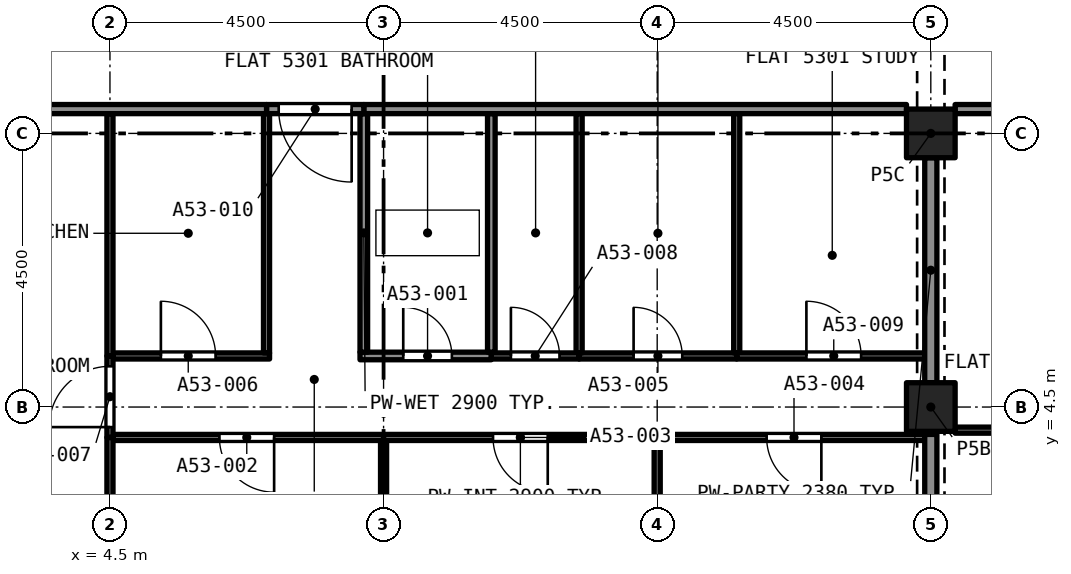
"""IFC4 building model, lengths in metres.
Left out: names, types, materials, properties, quantities, classifications, styles, units other than length and angle.
Written with IfcOpenShell. Run it as: python <this file> out.ifc"""

import sys

from ifc_helpers import new_model, si_unit, direction, frame, frame_2d, origin, origin_2d, place, context, subcontext, project, spatial, rectangle, extrude, element, fill, save


model = new_model("IFC4")
c1 = context("Model", 3, precision=1e-05, world=origin(), true_north=direction((0.0, 1.0)))
c2 = subcontext(c1, "Body", "Model", "MODEL_VIEW")
j1 = project(units=[si_unit("LENGTHUNIT", "METRE"), si_unit("PLANEANGLEUNIT", "RADIAN")], contexts=[c1])
p1 = place(None, origin())
s1 = spatial("IfcSite", under=j1, at=p1, CompositionType="ELEMENT")
p2 = place(p1, origin())
s2 = spatial("IfcBuilding", under=s1, at=p2, CompositionType="ELEMENT")
p3 = place(p2, frame((0.0, 0.0, 192.3)))
s3 = spatial("IfcBuildingStorey", under=s2, at=p3, CompositionType="ELEMENT", Elevation=192.3)
for number, where, z_axis, x_axis in (
    (1, (18.0, 4.5, 0.0), (0.0, 0.0, 1.0), (1.0, 0.0, 0.0)),
    (2, (18.0, 9.0, 0.0), (0.0, 0.0, 1.0), (1.0, 0.0, 0.0)),
):
    element("IfcColumn", number, at=place(p3, frame(where, z_axis=z_axis, x_axis=x_axis)), inside=s3, PredefinedType="COLUMN", context=c2, shape_type="SweptSolid", body=[
        extrude(rectangle(XDim=0.8, YDim=0.8, at=origin_2d()), origin(), (0.0, 0.0, 1.0), 3.2),
    ])
p4 = place(p3, frame((8.613, 5.34, 0.0), z_axis=(0.0, 0.0, 1.0), x_axis=(1.0, 0.0, 0.0)))
e3 = element("IfcWall", 3, at=p4, inside=s3, PredefinedType="PARTITIONING", context=c2, shape_type="SweptSolid", body=[
    extrude(rectangle(XDim=2.159, YDim=0.125, at=frame_2d((1.08, 0.0))), origin(), (0.0, 0.0, 1.0), 2.9),
])
p5 = place(p4, frame((0.711, 0.0, 0.0)))
e4 = element("IfcOpeningElement", 4, at=p5, cuts=e3, PredefinedType="OPENING", context=c2, shape_type="SweptSolid", body=[
    extrude(rectangle(XDim=0.8, YDim=2.1, at=frame_2d((0.4, 1.05))), frame((0.0, 0.073, 0.0), z_axis=(0.0, -1.0, 0.0), x_axis=(1.0, 0.0, 0.0)), (0.0, 0.0, 1.0), 0.145),
])
for number, where, z_axis, x_axis in (
    (5, (8.675, 5.403, 0.0), (0.0, 0.0, 1.0), (0.0, 1.0, 0.0)),
    (6, (10.772, 5.403, 0.0), (0.0, 0.0, 1.0), (0.0, 1.0, 0.0)),
):
    element("IfcWall", number, at=place(p3, frame(where, z_axis=z_axis, x_axis=x_axis)), inside=s3, PredefinedType="PARTITIONING", context=c2, shape_type="SweptSolid", body=[
        extrude(rectangle(XDim=3.922, YDim=0.125, at=frame_2d((1.961, 0.0))), origin(), (0.0, 0.0, 1.0), 2.9),
    ])
p6 = place(p3, frame((8.675, 9.4, 0.0), z_axis=(0.0, 0.0, 1.0), x_axis=(1.0, 0.0, 0.0)))
e7 = element("IfcWall", 7, at=p6, inside=s3, PredefinedType="PARTITIONING", context=c2, shape_type="SweptSolid", body=[
    extrude(rectangle(XDim=8.925, YDim=0.15, at=frame_2d((4.462, 0.0))), origin(), (0.0, 0.0, 1.0), 2.9),
])
p7 = place(p3, frame((9.0, 0.4, 0.0), z_axis=(0.0, 0.0, 1.0), x_axis=(0.0, 1.0, 0.0)))
e8 = element("IfcWall", 8, at=p7, inside=s3, PredefinedType="PARTITIONING", context=c2, shape_type="SweptSolid", body=[
    extrude(rectangle(XDim=3.55, YDim=0.1, at=frame_2d((1.775, 0.0))), origin(), (0.0, 0.0, 1.0), 2.9),
])
p8 = place(p3, frame((9.0, 4.0, 0.0), z_axis=(0.0, 0.0, 1.0), x_axis=(-1.0, 0.0, 0.0)))
e9 = element("IfcWall", 9, at=p8, inside=s3, PredefinedType="PARTITIONING", context=c2, shape_type="SweptSolid", body=[
    extrude(rectangle(XDim=4.45, YDim=0.1, at=frame_2d((2.225, 0.0))), origin(), (0.0, 0.0, 1.0), 2.9),
])
p9 = place(p8, frame((1.8, 0.0, 0.0)))
e10 = element("IfcOpeningElement", 10, at=p9, cuts=e9, PredefinedType="OPENING", context=c2, shape_type="SweptSolid", body=[
    extrude(rectangle(XDim=0.9, YDim=2.1, at=frame_2d((0.45, 1.05))), frame((0.0, 0.06, 0.0), z_axis=(0.0, -1.0, 0.0), x_axis=(1.0, 0.0, 0.0)), (0.0, 0.0, 1.0), 0.12),
])
p10 = place(p3, frame((4.5, 0.433, 0.0), z_axis=(0.0, 0.0, 1.0), x_axis=(0.0, 1.0, 0.0)))
e11 = element("IfcWall", 11, at=p10, inside=s3, PredefinedType="PARTITIONING", context=c2, shape_type="SweptSolid", body=[
    extrude(rectangle(XDim=3.567, YDim=0.1, at=frame_2d((1.784, 0.0))), origin(), (0.0, 0.0, 1.0), 2.9),
])
p11 = place(p3, frame((13.5, 0.4, 0.0), z_axis=(0.0, 0.0, 1.0), x_axis=(0.0, 1.0, 0.0)))
e12 = element("IfcWall", 12, at=p11, inside=s3, PredefinedType="PARTITIONING", context=c2, shape_type="SweptSolid", body=[
    extrude(rectangle(XDim=3.55, YDim=0.1, at=frame_2d((1.775, 0.0))), origin(), (0.0, 0.0, 1.0), 2.9),
])
p12 = place(p3, frame((13.5, 4.0, 0.0), z_axis=(0.0, 0.0, 1.0), x_axis=(-1.0, 0.0, 0.0)))
e13 = element("IfcWall", 13, at=p12, inside=s3, PredefinedType="PARTITIONING", context=c2, shape_type="SweptSolid", body=[
    extrude(rectangle(XDim=4.5, YDim=0.1, at=frame_2d((2.25, 0.0))), origin(), (0.0, 0.0, 1.0), 2.9),
])
p13 = place(p12, frame((1.8, 0.0, 0.0)))
e14 = element("IfcOpeningElement", 14, at=p13, cuts=e13, PredefinedType="OPENING", context=c2, shape_type="SweptSolid", body=[
    extrude(rectangle(XDim=0.9, YDim=2.1, at=frame_2d((0.45, 1.05))), frame((0.0, 0.06, 0.0), z_axis=(0.0, -1.0, 0.0), x_axis=(1.0, 0.0, 0.0)), (0.0, 0.0, 1.0), 0.12),
])
p14 = place(p3, frame((17.9, 4.0, 0.0), z_axis=(0.0, 0.0, 1.0), x_axis=(-1.0, 0.0, 0.0)))
e15 = element("IfcWall", 15, at=p14, inside=s3, PredefinedType="PARTITIONING", context=c2, shape_type="SweptSolid", body=[
    extrude(rectangle(XDim=4.4, YDim=0.1, at=frame_2d((2.2, 0.0))), origin(), (0.0, 0.0, 1.0), 2.9),
])
p15 = place(p14, frame((1.7, 0.0, 0.0)))
e16 = element("IfcOpeningElement", 16, at=p15, cuts=e15, PredefinedType="OPENING", context=c2, shape_type="SweptSolid", body=[
    extrude(rectangle(XDim=0.9, YDim=2.1, at=frame_2d((0.45, 1.05))), frame((0.0, 0.06, 0.0), z_axis=(0.0, -1.0, 0.0), x_axis=(1.0, 0.0, 0.0)), (0.0, 0.0, 1.0), 0.12),
])
p16 = place(p3, frame((18.0, 0.4, 0.0), z_axis=(0.0, 0.0, 1.0), x_axis=(0.0, 1.0, 0.0)))
e17 = element("IfcWall", 17, at=p16, inside=s3, PredefinedType="PARTITIONING", context=c2, shape_type="SweptSolid", body=[
    extrude(rectangle(XDim=3.65, YDim=0.2, at=frame_2d((1.825, 0.0))), origin(), (0.0, 0.0, 1.0), 2.38),
])
p17 = place(p3, frame((12.216, 5.34, 0.0), z_axis=(0.0, 0.0, 1.0), x_axis=(1.0, 0.0, 0.0)))
e18 = element("IfcWall", 18, at=p17, inside=s3, PredefinedType="PARTITIONING", context=c2, shape_type="SweptSolid", body=[
    extrude(rectangle(XDim=2.591, YDim=0.1, at=frame_2d((1.296, 0.0))), origin(), (0.0, 0.0, 1.0), 2.9),
])
p18 = place(p17, frame((0.896, 0.0, 0.0)))
e19 = element("IfcOpeningElement", 19, at=p18, cuts=e18, PredefinedType="OPENING", context=c2, shape_type="SweptSolid", body=[
    extrude(rectangle(XDim=0.8, YDim=2.1, at=frame_2d((0.4, 1.05))), frame((0.0, 0.06, 0.0), z_axis=(0.0, -1.0, 0.0), x_axis=(1.0, 0.0, 0.0)), (0.0, 0.0, 1.0), 0.12),
])
for number, where, z_axis, x_axis in (
    (20, (12.216, 5.39, 0.0), (0.0, 0.0, 1.0), (0.0, 1.0, 0.0)),
    (21, (14.808, 5.39, 0.0), (0.0, 0.0, 1.0), (0.0, 1.0, 0.0)),
):
    element("IfcWall", number, at=place(p3, frame(where, z_axis=z_axis, x_axis=x_axis)), inside=s3, PredefinedType="PARTITIONING", context=c2, shape_type="SweptSolid", body=[
        extrude(rectangle(XDim=3.935, YDim=0.1, at=frame_2d((1.968, 0.0))), origin(), (0.0, 0.0, 1.0), 2.9),
    ])
p19 = place(p3, frame((4.55, 5.34, 0.0), z_axis=(0.0, 0.0, 1.0), x_axis=(1.0, 0.0, 0.0)))
e22 = element("IfcWall", 22, at=p19, inside=s3, PredefinedType="PARTITIONING", context=c2, shape_type="SweptSolid", body=[
    extrude(rectangle(XDim=2.575, YDim=0.1, at=frame_2d((1.288, 0.0))), origin(), (0.0, 0.0, 1.0), 2.9),
])
p20 = place(p19, frame((0.788, 0.0, 0.0)))
e23 = element("IfcOpeningElement", 23, at=p20, cuts=e22, PredefinedType="OPENING", context=c2, shape_type="SweptSolid", body=[
    extrude(rectangle(XDim=0.9, YDim=2.1, at=frame_2d((0.45, 1.05))), frame((0.0, 0.06, 0.0), z_axis=(0.0, -1.0, 0.0), x_axis=(1.0, 0.0, 0.0)), (0.0, 0.0, 1.0), 0.12),
])
p21 = place(p3, frame((7.075, 5.39, 0.0), z_axis=(0.0, 0.0, 1.0), x_axis=(0.0, 1.0, 0.0)))
e24 = element("IfcWall", 24, at=p21, inside=s3, PredefinedType="PARTITIONING", context=c2, shape_type="SweptSolid", body=[
    extrude(rectangle(XDim=3.935, YDim=0.1, at=frame_2d((1.968, 0.0))), origin(), (0.0, 0.0, 1.0), 2.9),
])
p22 = place(p3, frame((4.5, 4.0, 0.0), z_axis=(0.0, 0.0, 1.0), x_axis=(0.0, 1.0, 0.0)))
e25 = element("IfcWall", 25, at=p22, inside=s3, PredefinedType="PARTITIONING", context=c2, shape_type="SweptSolid", body=[
    extrude(rectangle(XDim=1.34, YDim=0.1, at=frame_2d((0.67, 0.0))), origin(), (0.0, 0.0, 1.0), 2.9),
])
p23 = place(p22, frame((0.17, 0.0, 0.0)))
e26 = element("IfcOpeningElement", 26, at=p23, cuts=e25, PredefinedType="OPENING", context=c2, shape_type="SweptSolid", body=[
    extrude(rectangle(XDim=1.0, YDim=2.1, at=frame_2d((0.5, 1.05))), frame((0.0, 0.06, 0.0), z_axis=(0.0, -1.0, 0.0), x_axis=(1.0, 0.0, 0.0)), (0.0, 0.0, 1.0), 0.12),
])
p24 = place(p3, frame((10.772, 5.34, 0.0), z_axis=(0.0, 0.0, 1.0), x_axis=(1.0, 0.0, 0.0)))
e27 = element("IfcWall", 27, at=p24, inside=s3, PredefinedType="PARTITIONING", context=c2, shape_type="SweptSolid", body=[
    extrude(rectangle(XDim=1.445, YDim=0.1, at=frame_2d((0.722, 0.0))), origin(), (0.0, 0.0, 1.0), 2.9),
])
p25 = place(p24, frame((0.322, 0.0, 0.0)))
e28 = element("IfcOpeningElement", 28, at=p25, cuts=e27, PredefinedType="OPENING", context=c2, shape_type="SweptSolid", body=[
    extrude(rectangle(XDim=0.8, YDim=2.1, at=frame_2d((0.4, 1.05))), frame((0.0, 0.06, 0.0), z_axis=(0.0, -1.0, 0.0), x_axis=(1.0, 0.0, 0.0)), (0.0, 0.0, 1.0), 0.12),
])
p26 = place(p3, frame((14.808, 5.34, 0.0), z_axis=(0.0, 0.0, 1.0), x_axis=(1.0, 0.0, 0.0)))
e29 = element("IfcWall", 29, at=p26, inside=s3, PredefinedType="PARTITIONING", context=c2, shape_type="SweptSolid", body=[
    extrude(rectangle(XDim=3.092, YDim=0.1, at=frame_2d((1.546, 0.0))), origin(), (0.0, 0.0, 1.0), 2.9),
])
p27 = place(p26, frame((1.146, 0.0, 0.0)))
e30 = element("IfcOpeningElement", 30, at=p27, cuts=e29, PredefinedType="OPENING", context=c2, shape_type="SweptSolid", body=[
    extrude(rectangle(XDim=0.9, YDim=2.1, at=frame_2d((0.45, 1.05))), frame((0.0, 0.06, 0.0), z_axis=(0.0, -1.0, 0.0), x_axis=(1.0, 0.0, 0.0)), (0.0, 0.0, 1.0), 0.12),
])
p28 = place(p3, frame((18.0, 4.9, 0.0), z_axis=(0.0, 0.0, 1.0), x_axis=(0.0, 1.0, 0.0)))
e31 = element("IfcWall", 31, at=p28, inside=s3, PredefinedType="PARTITIONING", context=c2, shape_type="SweptSolid", body=[
    extrude(rectangle(XDim=3.7, YDim=0.2, at=frame_2d((1.85, 0.0))), origin(), (0.0, 0.0, 1.0), 2.38),
])
p29 = place(p3, frame((8.675, 9.4, 0.0), z_axis=(0.0, 0.0, 1.0), x_axis=(-1.0, 0.0, 0.0)))
e32 = element("IfcWall", 32, at=p29, inside=s3, PredefinedType="PARTITIONING", context=c2, shape_type="SweptSolid", body=[
    extrude(rectangle(XDim=1.6, YDim=0.15, at=frame_2d((0.8, 0.0))), origin(), (0.0, 0.0, 1.0), 2.9),
])
p30 = place(p29, frame((0.2, 0.0, 0.0)))
e33 = element("IfcOpeningElement", 33, at=p30, cuts=e32, PredefinedType="OPENING", context=c2, shape_type="SweptSolid", body=[
    extrude(rectangle(XDim=1.2, YDim=2.4, at=frame_2d((0.6, 1.2))), frame((0.0, 0.085, 0.0), z_axis=(0.0, -1.0, 0.0), x_axis=(1.0, 0.0, 0.0)), (0.0, 0.0, 1.0), 0.17),
])
p31 = place(p3, frame((4.5, 5.34, 0.0), z_axis=(0.0, 0.0, 1.0), x_axis=(0.0, 1.0, 0.0)))
e34 = element("IfcWall", 34, at=p31, inside=s3, PredefinedType="PARTITIONING", context=c2, shape_type="SweptSolid", body=[
    extrude(rectangle(XDim=3.985, YDim=0.1, at=frame_2d((1.992, 0.0))), origin(), (0.0, 0.0, 1.0), 2.9),
])
p32 = place(p3, frame((0.4, 9.4, 0.0), z_axis=(0.0, 0.0, 1.0), x_axis=(1.0, 0.0, 0.0)))
e35 = element("IfcWall", 35, at=p32, inside=s3, PredefinedType="PARTITIONING", context=c2, shape_type="SweptSolid", body=[
    extrude(rectangle(XDim=6.675, YDim=0.15, at=frame_2d((3.337, 0.0))), origin(), (0.0, 0.0, 1.0), 2.9),
])
p33 = place(p3, frame((22.5, 4.12, 0.0), z_axis=(0.0, 0.0, 1.0), x_axis=(-1.0, 0.0, 0.0)))
e36 = element("IfcWall", 36, at=p33, inside=s3, PredefinedType="PARTITIONING", context=c2, shape_type="SweptSolid", body=[
    extrude(rectangle(XDim=4.1, YDim=0.1, at=frame_2d((2.05, 0.0))), origin(), (0.0, 0.0, 1.0), 2.75),
])
p34 = place(p33, frame((1.8, 0.0, 0.0)))
e37 = element("IfcOpeningElement", 37, at=p34, cuts=e36, PredefinedType="OPENING", context=c2, shape_type="SweptSolid", body=[
    extrude(rectangle(XDim=0.9, YDim=2.1, at=frame_2d((0.45, 1.05))), frame((0.0, 0.06, 0.0), z_axis=(0.0, -1.0, 0.0), x_axis=(1.0, 0.0, 0.0)), (0.0, 0.0, 1.0), 0.12),
])
p35 = place(p3, frame((21.05, 9.4, 0.0), z_axis=(0.0, 0.0, 1.0), x_axis=(-1.0, 0.0, 0.0)))
e38 = element("IfcWall", 38, at=p35, inside=s3, PredefinedType="PARTITIONING", context=c2, shape_type="SweptSolid", body=[
    extrude(rectangle(XDim=2.65, YDim=0.15, at=frame_2d((1.325, 0.0))), origin(), (0.0, 0.0, 1.0), 2.75),
])
p36 = place(p35, frame((0.2, 0.0, 0.0)))
e39 = element("IfcOpeningElement", 39, at=p36, cuts=e38, PredefinedType="OPENING", context=c2, shape_type="SweptSolid", body=[
    extrude(rectangle(XDim=1.2, YDim=2.4, at=frame_2d((0.6, 1.2))), frame((0.0, 0.085, 0.0), z_axis=(0.0, -1.0, 0.0), x_axis=(1.0, 0.0, 0.0)), (0.0, 0.0, 1.0), 0.17),
])
p37 = place(p5, origin())
e40 = element("IfcDoor", 40, at=p37, inside=s3, OperationType="SINGLE_SWING_RIGHT", PredefinedType="DOOR", context=c2, shape_type="SweptSolid", body=[
    extrude(rectangle(XDim=0.8, YDim=2.1, at=frame_2d((0.4, 1.05))), frame((0.0, 0.025, 0.0), z_axis=(0.0, -1.0, 0.0), x_axis=(1.0, 0.0, 0.0)), (0.0, 0.0, 1.0), 0.05),
])
fill(e4, e40)
p38 = place(p9, origin())
e41 = element("IfcDoor", 41, at=p38, inside=s3, OperationType="SINGLE_SWING_RIGHT", PredefinedType="DOOR", context=c2, shape_type="SweptSolid", body=[
    extrude(rectangle(XDim=0.9, YDim=2.1, at=frame_2d((0.45, 1.05))), frame((0.0, 0.025, 0.0), z_axis=(0.0, -1.0, 0.0), x_axis=(1.0, 0.0, 0.0)), (0.0, 0.0, 1.0), 0.05),
])
fill(e10, e41)
p39 = place(p13, origin())
e42 = element("IfcDoor", 42, at=p39, inside=s3, OperationType="SINGLE_SWING_LEFT", PredefinedType="DOOR", context=c2, shape_type="SweptSolid", body=[
    extrude(rectangle(XDim=0.9, YDim=2.1, at=frame_2d((0.45, 1.05))), frame((0.0, 0.025, 0.0), z_axis=(0.0, -1.0, 0.0), x_axis=(1.0, 0.0, 0.0)), (0.0, 0.0, 1.0), 0.05),
])
fill(e14, e42)
p40 = place(p15, origin())
e43 = element("IfcDoor", 43, at=p40, inside=s3, OperationType="SINGLE_SWING_LEFT", PredefinedType="DOOR", context=c2, shape_type="SweptSolid", body=[
    extrude(rectangle(XDim=0.9, YDim=2.1, at=frame_2d((0.45, 1.05))), frame((0.0, 0.025, 0.0), z_axis=(0.0, -1.0, 0.0), x_axis=(1.0, 0.0, 0.0)), (0.0, 0.0, 1.0), 0.05),
])
fill(e16, e43)
p41 = place(p18, origin())
e44 = element("IfcDoor", 44, at=p41, inside=s3, OperationType="SINGLE_SWING_LEFT", PredefinedType="DOOR", context=c2, shape_type="SweptSolid", body=[
    extrude(rectangle(XDim=0.8, YDim=2.1, at=frame_2d((0.4, 1.05))), frame((0.0, 0.025, 0.0), z_axis=(0.0, -1.0, 0.0), x_axis=(1.0, 0.0, 0.0)), (0.0, 0.0, 1.0), 0.05),
])
fill(e19, e44)
p42 = place(p20, origin())
e45 = element("IfcDoor", 45, at=p42, inside=s3, OperationType="SINGLE_SWING_LEFT", PredefinedType="DOOR", context=c2, shape_type="SweptSolid", body=[
    extrude(rectangle(XDim=0.9, YDim=2.1, at=frame_2d((0.45, 1.05))), frame((0.0, 0.025, 0.0), z_axis=(0.0, -1.0, 0.0), x_axis=(1.0, 0.0, 0.0)), (0.0, 0.0, 1.0), 0.05),
])
fill(e23, e45)
p43 = place(p23, origin())
e46 = element("IfcDoor", 46, at=p43, inside=s3, OperationType="SINGLE_SWING_RIGHT", PredefinedType="DOOR", context=c2, shape_type="SweptSolid", body=[
    extrude(rectangle(XDim=1.0, YDim=2.1, at=frame_2d((0.5, 1.05))), frame((0.0, 0.025, 0.0), z_axis=(0.0, -1.0, 0.0), x_axis=(1.0, 0.0, 0.0)), (0.0, 0.0, 1.0), 0.05),
])
fill(e26, e46)
p44 = place(p25, origin())
e47 = element("IfcDoor", 47, at=p44, inside=s3, OperationType="SINGLE_SWING_RIGHT", PredefinedType="DOOR", context=c2, shape_type="SweptSolid", body=[
    extrude(rectangle(XDim=0.8, YDim=2.1, at=frame_2d((0.4, 1.05))), frame((0.0, 0.025, 0.0), z_axis=(0.0, -1.0, 0.0), x_axis=(1.0, 0.0, 0.0)), (0.0, 0.0, 1.0), 0.05),
])
fill(e28, e47)
p45 = place(p27, origin())
e48 = element("IfcDoor", 48, at=p45, inside=s3, OperationType="SINGLE_SWING_RIGHT", PredefinedType="DOOR", context=c2, shape_type="SweptSolid", body=[
    extrude(rectangle(XDim=0.9, YDim=2.1, at=frame_2d((0.45, 1.05))), frame((0.0, 0.025, 0.0), z_axis=(0.0, -1.0, 0.0), x_axis=(1.0, 0.0, 0.0)), (0.0, 0.0, 1.0), 0.05),
])
fill(e30, e48)
p46 = place(p30, origin())
e49 = element("IfcDoor", 49, at=p46, inside=s3, OperationType="SINGLE_SWING_RIGHT", PredefinedType="DOOR", context=c2, shape_type="SweptSolid", body=[
    extrude(rectangle(XDim=1.2, YDim=2.4, at=frame_2d((0.6, 1.2))), frame((0.0, 0.025, 0.0), z_axis=(0.0, -1.0, 0.0), x_axis=(1.0, 0.0, 0.0)), (0.0, 0.0, 1.0), 0.05),
])
fill(e33, e49)
save(model, sys.argv[1])
